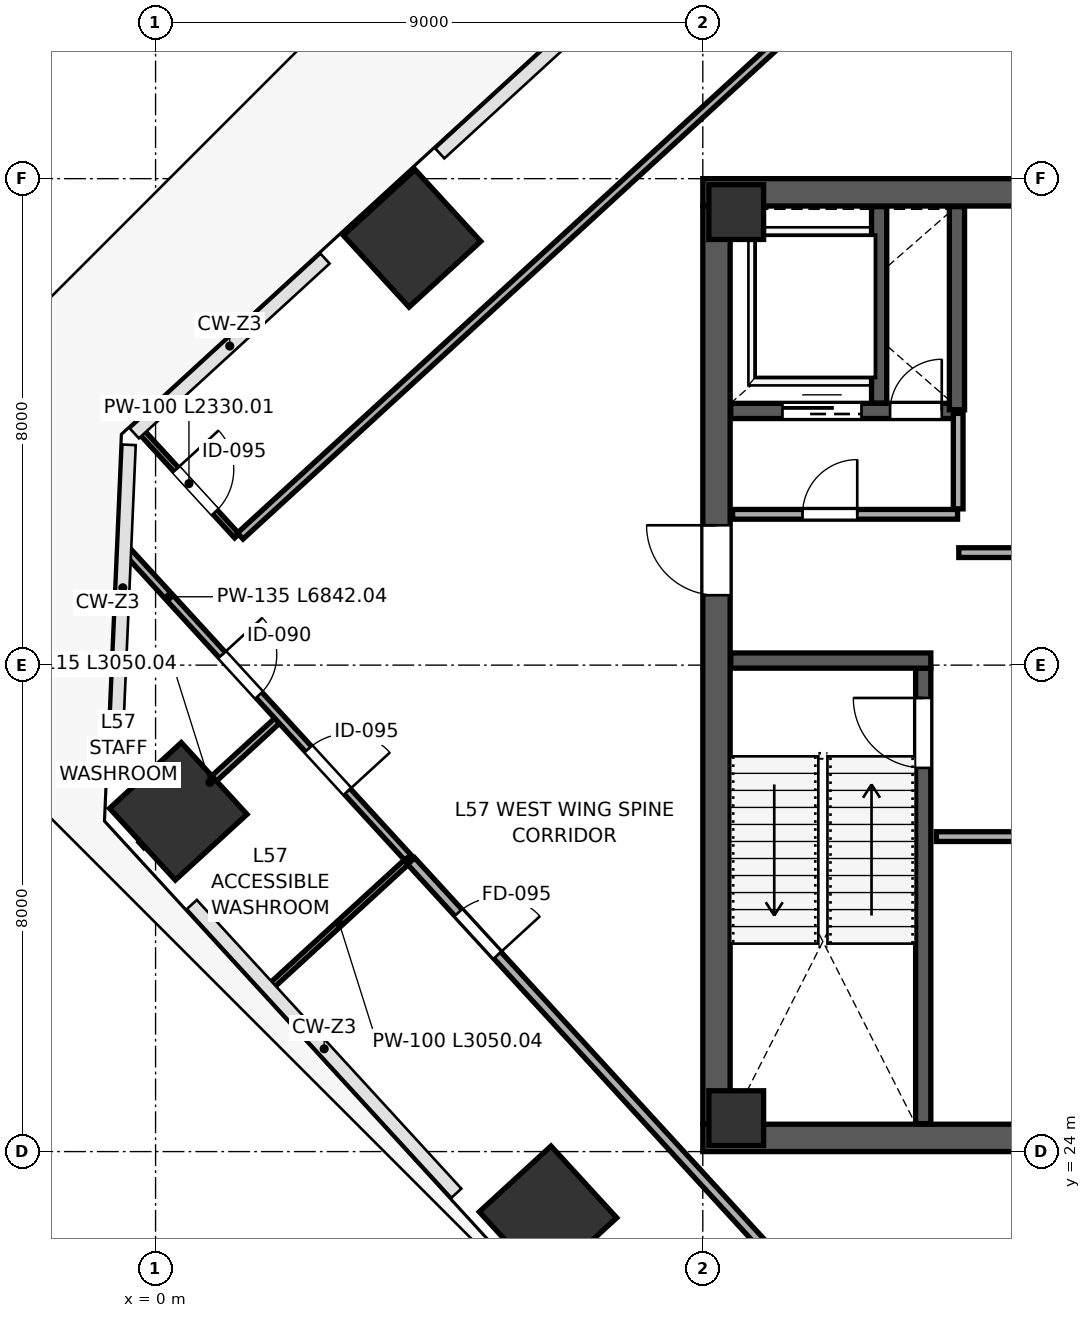
"""IFC4 building model, lengths in metres.
Left out: names, types, materials, properties, quantities, classifications, styles, units other than length and angle.
Written with IfcOpenShell. Run it as: python <this file> out.ifc"""

import sys

from ifc_helpers import new_model, si_unit, direction, frame, frame_2d, origin, origin_2d, place, context, subcontext, project, spatial, rectangle, extrude, source, transform, mapped, element, fill, save


model = new_model("IFC4")
c1 = context("Model", 3, precision=1e-05, world=origin(), true_north=direction((0.0, 1.0)))
c2 = subcontext(c1, "Body", "Model", "MODEL_VIEW")
j1 = project(units=[si_unit("LENGTHUNIT", "METRE"), si_unit("PLANEANGLEUNIT", "RADIAN")], contexts=[c1])
p1 = place(None, origin())
s1 = spatial("IfcSite", under=j1, at=p1, CompositionType="ELEMENT")
p2 = place(p1, origin())
s2 = spatial("IfcBuilding", under=s1, at=p2, CompositionType="ELEMENT")
p3 = place(p2, frame((0.0, 0.0, 254.2)))
s3 = spatial("IfcBuildingStorey", under=s2, at=p3, CompositionType="ELEMENT", Elevation=254.2)
m1 = source(origin(), c2, "Body", "SweptSolid", [
    extrude(rectangle(XDim=0.9, YDim=0.9, at=origin_2d()), origin(), (0.0, 0.0, 1.0), 4.198),
])
for number, where, z_axis, x_axis in (
    (1, (9.55, 24.55, 0.001), (0.0, 0.0, 1.0), (1.0, 0.0, 0.0)),
    (2, (9.55, 39.45, 0.001), (0.0, 0.0, 1.0), (1.0, 0.0, 0.0)),
):
    element("IfcColumn", number, at=place(p3, frame(where, z_axis=z_axis, x_axis=x_axis)), inside=s3, PredefinedType="COLUMN", context=c2, shape_type="MappedRepresentation", body=[
        mapped(m1, transform((0.0, 0.0, 0.0), scale=1.0)),
    ])
m2 = source(origin(), c2, "Body", "SweptSolid", [
    extrude(rectangle(XDim=1.6, YDim=1.6, at=origin_2d()), origin(), (0.0, 0.0, 1.0), 4.198),
])
for number, where, z_axis, x_axis in (
    (3, (0.374, 29.596, 0.001), (0.0, 0.0, 1.0), (-0.676, 0.737, 0.0)),
    (4, (6.454, 22.96, 0.001), (0.0, 0.0, 1.0), (-0.676, 0.737, 0.0)),
    (5, (4.218, 39.018, 0.001), (0.0, 0.0, 1.0), (-0.676, 0.737, 0.0)),
):
    element("IfcColumn", number, at=place(p3, frame(where, z_axis=z_axis, x_axis=x_axis)), inside=s3, PredefinedType="COLUMN", context=c2, shape_type="MappedRepresentation", body=[
        mapped(m2, transform((0.0, 0.0, 0.0), scale=1.0)),
    ])
p4 = place(p3, frame((9.225, 24.45, 0.0), z_axis=(0.0, 0.0, 1.0), x_axis=(0.0, 1.0, 0.0)))
e6 = element("IfcWall", 6, at=p4, inside=s3, PredefinedType="SHEAR", context=c2, shape_type="SweptSolid", body=[
    extrude(rectangle(XDim=15.1, YDim=0.45, at=frame_2d((7.55, 0.0))), origin(), (0.0, 0.0, 1.0), 3.96),
])
p5 = place(p4, frame((8.7, 0.0, 0.0)))
e7 = element("IfcOpeningElement", 7, at=p5, cuts=e6, PredefinedType="OPENING", context=c2, shape_type="SweptSolid", body=[
    extrude(rectangle(XDim=1.15, YDim=2.2, at=frame_2d((0.575, 1.1))), frame((0.0, 0.235, 0.0), z_axis=(0.0, -1.0, 0.0), x_axis=(1.0, 0.0, 0.0)), (0.0, 0.0, 1.0), 0.47),
])
for number, where, z_axis, x_axis in (
    (8, (9.0, 24.225, 0.0), (0.0, 0.0, 1.0), (1.0, 0.0, 0.0)),
    (9, (9.0, 39.775, 0.0), (0.0, 0.0, 1.0), (1.0, 0.0, 0.0)),
):
    element("IfcWall", number, at=place(p3, frame(where, z_axis=z_axis, x_axis=x_axis)), inside=s3, PredefinedType="SHEAR", context=c2, shape_type="SweptSolid", body=[
        extrude(rectangle(XDim=18.0, YDim=0.45, at=frame_2d((9.0, 0.0))), origin(), (0.0, 0.0, 1.0), 3.96),
    ])
p6 = place(p3, frame((12.625, 24.46, 0.0), z_axis=(0.0, 0.0, 1.0), x_axis=(0.0, 1.0, 0.0)))
e10 = element("IfcWall", 10, at=p6, inside=s3, PredefinedType="SHEAR", context=c2, shape_type="SweptSolid", body=[
    extrude(rectangle(XDim=7.49, YDim=0.25, at=frame_2d((3.745, 0.0))), origin(), (0.0, 0.0, 1.0), 3.96),
])
p7 = place(p6, frame((5.85, 0.0, 0.0)))
e11 = element("IfcOpeningElement", 11, at=p7, cuts=e10, PredefinedType="OPENING", context=c2, shape_type="SweptSolid", body=[
    extrude(rectangle(XDim=1.15, YDim=2.2, at=frame_2d((0.575, 1.1))), frame((0.0, 0.135, 0.0), z_axis=(0.0, -1.0, 0.0), x_axis=(1.0, 0.0, 0.0)), (0.0, 0.0, 1.0), 0.27),
])
p8 = place(p3, frame((9.46, 32.075, 0.0), z_axis=(0.0, 0.0, 1.0), x_axis=(1.0, 0.0, 0.0)))
e12 = element("IfcWall", 12, at=p8, inside=s3, PredefinedType="SHEAR", context=c2, shape_type="SweptSolid", body=[
    extrude(rectangle(XDim=3.29, YDim=0.25, at=frame_2d((1.645, 0.0))), origin(), (0.0, 0.0, 1.0), 3.96),
])
p9 = place(p3, frame((9.46, 36.18, 0.0), z_axis=(0.0, 0.0, 1.0), x_axis=(1.0, 0.0, 0.0)))
e13 = element("IfcWall", 13, at=p9, inside=s3, PredefinedType="SHEAR", context=c2, shape_type="SweptSolid", body=[
    extrude(rectangle(XDim=3.79, YDim=0.25, at=frame_2d((1.895, 0.0))), origin(), (0.0, 0.0, 1.0), 3.96),
])
p10 = place(p9, frame((2.62, 0.0, 0.0)))
e14 = element("IfcOpeningElement", 14, at=p10, cuts=e13, PredefinedType="OPENING", context=c2, shape_type="SweptSolid", body=[
    extrude(rectangle(XDim=0.85, YDim=2.1, at=frame_2d((0.425, 1.05))), frame((0.0, 0.135, 0.0), z_axis=(0.0, -1.0, 0.0), x_axis=(1.0, 0.0, 0.0)), (0.0, 0.0, 1.0), 0.27),
])
p11 = place(p9, frame((0.85, 0.0, 0.0)))
e15 = element("IfcOpeningElement", 15, at=p11, cuts=e13, PredefinedType="OPENING", context=c2, shape_type="SweptSolid", body=[
    extrude(rectangle(XDim=1.3, YDim=2.25, at=frame_2d((0.65, 1.125))), frame((0.0, 0.135, 0.0), z_axis=(0.0, -1.0, 0.0), x_axis=(1.0, 0.0, 0.0)), (0.0, 0.0, 1.0), 0.27),
])
p12 = place(p3, frame((11.9, 36.31, 0.0), z_axis=(0.0, 0.0, 1.0), x_axis=(0.0, 1.0, 0.0)))
e16 = element("IfcWall", 16, at=p12, inside=s3, PredefinedType="SHEAR", context=c2, shape_type="SweptSolid", body=[
    extrude(rectangle(XDim=3.23, YDim=0.25, at=frame_2d((1.615, 0.0))), origin(), (0.0, 0.0, 1.0), 3.96),
])
p13 = place(p3, frame((13.18, 36.2, 0.0), z_axis=(0.0, 0.0, 1.0), x_axis=(0.0, 1.0, 0.0)))
e17 = element("IfcWall", 17, at=p13, inside=s3, PredefinedType="SHEAR", context=c2, shape_type="SweptSolid", body=[
    extrude(rectangle(XDim=3.34, YDim=0.25, at=frame_2d((1.67, 0.0))), origin(), (0.0, 0.0, 1.0), 3.96),
])
p14 = place(p3, frame((9.49, 34.48, 0.0), z_axis=(0.0, 0.0, 1.0), x_axis=(1.0, 0.0, 0.0)))
e18 = element("IfcWall", 18, at=p14, inside=s3, PredefinedType="PARTITIONING", context=c2, shape_type="SweptSolid", body=[
    extrude(rectangle(XDim=3.7, YDim=0.16, at=frame_2d((1.85, 0.0))), origin(), (0.0, 0.0, 1.0), 3.96),
])
p15 = place(p14, frame((1.15, 0.0, 0.0)))
e19 = element("IfcOpeningElement", 19, at=p15, cuts=e18, PredefinedType="OPENING", context=c2, shape_type="SweptSolid", body=[
    extrude(rectangle(XDim=0.9, YDim=2.15, at=frame_2d((0.45, 1.075))), frame((0.0, 0.09, 0.0), z_axis=(0.0, -1.0, 0.0), x_axis=(1.0, 0.0, 0.0)), (0.0, 0.0, 1.0), 0.18),
])
p16 = place(p3, frame((13.2, 34.57, 0.0), z_axis=(0.0, 0.0, 1.0), x_axis=(0.0, 1.0, 0.0)))
e20 = element("IfcWall", 20, at=p16, inside=s3, PredefinedType="PARTITIONING", context=c2, shape_type="SweptSolid", body=[
    extrude(rectangle(XDim=1.57, YDim=0.16, at=frame_2d((0.785, 0.0))), origin(), (0.0, 0.0, 1.0), 3.96),
])
p17 = place(p3, frame((13.21, 33.85, 0.0), z_axis=(0.0, 0.0, 1.0), x_axis=(1.0, 0.0, 0.0)))
e21 = element("IfcWall", 21, at=p17, inside=s3, PredefinedType="PARTITIONING", context=c2, shape_type="SweptSolid", body=[
    extrude(rectangle(XDim=4.1, YDim=0.16, at=frame_2d((2.05, 0.0))), origin(), (0.0, 0.0, 1.0), 3.96),
])
p18 = place(p17, frame((1.35, 0.0, 0.0)))
e22 = element("IfcOpeningElement", 22, at=p18, cuts=e21, PredefinedType="OPENING", context=c2, shape_type="SweptSolid", body=[
    extrude(rectangle(XDim=0.9, YDim=2.15, at=frame_2d((0.45, 1.075))), frame((0.0, 0.09, 0.0), z_axis=(0.0, -1.0, 0.0), x_axis=(1.0, 0.0, 0.0)), (0.0, 0.0, 1.0), 0.18),
])
p19 = place(p3, frame((12.84, 29.18, 0.0), z_axis=(0.0, 0.0, 1.0), x_axis=(1.0, 0.0, 0.0)))
e23 = element("IfcWall", 23, at=p19, inside=s3, PredefinedType="PARTITIONING", context=c2, shape_type="SweptSolid", body=[
    extrude(rectangle(XDim=8.37, YDim=0.16, at=frame_2d((4.185, 0.0))), origin(), (0.0, 0.0, 1.0), 3.96),
])
p20 = place(p19, frame((2.6, 0.0, 0.0)))
e24 = element("IfcOpeningElement", 24, at=p20, cuts=e23, PredefinedType="OPENING", context=c2, shape_type="SweptSolid", body=[
    extrude(rectangle(XDim=0.9, YDim=2.15, at=frame_2d((0.45, 1.075))), frame((0.0, 0.09, 0.0), z_axis=(0.0, -1.0, 0.0), x_axis=(1.0, 0.0, 0.0)), (0.0, 0.0, 1.0), 0.18),
])
p21 = place(p3, frame((-0.231, 29.042, 0.0), z_axis=(0.0, 0.0, 1.0), x_axis=(0.737290351983, 0.675576003772, 0.0)))
e25 = element("IfcWall", 25, at=p21, inside=s3, PredefinedType="PARTITIONING", context=c2, shape_type="SweptSolid", body=[
    extrude(rectangle(XDim=3.05, YDim=0.115, at=frame_2d((1.525, 0.0))), origin(), (0.0, 0.0, 1.0), 3.295),
])
p22 = place(p3, frame((1.897, 26.719, 0.0), z_axis=(0.0, 0.0, 1.0), x_axis=(0.737290351983, 0.675576003772, 0.0)))
e26 = element("IfcWall", 26, at=p22, inside=s3, PredefinedType="PARTITIONING", context=c2, shape_type="SweptSolid", body=[
    extrude(rectangle(XDim=3.05, YDim=0.1, at=frame_2d((1.525, 0.0))), origin(), (0.0, 0.0, 1.0), 3.295),
])
p23 = place(p3, frame((-0.474, 33.881, 0.0), z_axis=(0.0, 0.0, 1.0), x_axis=(0.675605050901, -0.73726373517, 0.0)))
e27 = element("IfcWall", 27, at=p23, inside=s3, PredefinedType="PARTITIONING", context=c2, shape_type="SweptSolid", body=[
    extrude(rectangle(XDim=6.842, YDim=0.135, at=frame_2d((3.421, 0.0))), origin(), (0.0, 0.0, 1.0), 3.96),
])
p24 = place(p23, frame((2.32, 0.0, 0.0)))
e28 = element("IfcOpeningElement", 28, at=p24, cuts=e27, PredefinedType="OPENING", context=c2, shape_type="SweptSolid", body=[
    extrude(rectangle(XDim=0.9, YDim=2.15, at=frame_2d((0.45, 1.075))), frame((0.0, 0.078, 0.0), z_axis=(0.0, -1.0, 0.0), x_axis=(1.0, 0.0, 0.0)), (0.0, 0.0, 1.0), 0.155),
])
p25 = place(p23, frame((4.42, 0.0, 0.0)))
e29 = element("IfcOpeningElement", 29, at=p25, cuts=e27, PredefinedType="OPENING", context=c2, shape_type="SweptSolid", body=[
    extrude(rectangle(XDim=0.95, YDim=2.15, at=frame_2d((0.475, 1.075))), frame((0.0, 0.078, 0.0), z_axis=(0.0, -1.0, 0.0), x_axis=(1.0, 0.0, 0.0)), (0.0, 0.0, 1.0), 0.155),
])
p26 = place(p3, frame((4.203, 28.778, 0.0), z_axis=(0.0, 0.0, 1.0), x_axis=(0.675591041558, -0.737276572642, 0.0)))
e30 = element("IfcWall", 30, at=p26, inside=s3, PredefinedType="PARTITIONING", context=c2, shape_type="SweptSolid", body=[
    extrude(rectangle(XDim=14.07, YDim=0.16, at=frame_2d((7.035, 0.0))), origin(), (0.0, 0.0, 1.0), 3.96),
])
p27 = place(p26, frame((1.15, 0.0, 0.0)))
e31 = element("IfcOpeningElement", 31, at=p27, cuts=e30, PredefinedType="OPENING", context=c2, shape_type="SweptSolid", body=[
    extrude(rectangle(XDim=0.95, YDim=2.15, at=frame_2d((0.475, 1.075))), frame((0.0, 0.09, 0.0), z_axis=(0.0, -1.0, 0.0), x_axis=(1.0, 0.0, 0.0)), (0.0, 0.0, 1.0), 0.18),
])
p28 = place(p3, frame((13.765, 18.402, 0.0), z_axis=(0.0, 0.0, 1.0), x_axis=(0.737266340408, 0.675602207887, 0.0)))
e32 = element("IfcWall", 32, at=p28, inside=s3, PredefinedType="PARTITIONING", context=c2, shape_type="SweptSolid", body=[
    extrude(rectangle(XDim=8.128, YDim=0.16, at=frame_2d((4.064, 0.0))), origin(), (0.0, 0.0, 1.0), 3.96),
])
p29 = place(p3, frame((-0.238, 35.844, 0.0), z_axis=(0.0, 0.0, 1.0), x_axis=(0.67562972666, -0.737241122329, 0.0)))
e33 = element("IfcWall", 33, at=p29, inside=s3, PredefinedType="PARTITIONING", context=c2, shape_type="SweptSolid", body=[
    extrude(rectangle(XDim=2.33, YDim=0.1, at=frame_2d((1.165, 0.0))), origin(), (0.0, 0.0, 1.0), 3.96),
])
p30 = place(p29, frame((0.85, 0.0, 0.0)))
e34 = element("IfcOpeningElement", 34, at=p30, cuts=e33, PredefinedType="OPENING", context=c2, shape_type="SweptSolid", body=[
    extrude(rectangle(XDim=0.95, YDim=2.15, at=frame_2d((0.475, 1.075))), frame((0.0, 0.06, 0.0), z_axis=(0.0, -1.0, 0.0), x_axis=(1.0, 0.0, 0.0)), (0.0, 0.0, 1.0), 0.12),
])
p31 = place(p3, frame((1.393, 34.124, 0.0), z_axis=(0.0, 0.0, 1.0), x_axis=(0.737274323436, 0.675593496121, 0.0)))
e35 = element("IfcWall", 35, at=p31, inside=s3, PredefinedType="PARTITIONING", context=c2, shape_type="SweptSolid", body=[
    extrude(rectangle(XDim=27.402, YDim=0.135, at=frame_2d((13.701, 0.0))), origin(), (0.0, 0.0, 1.0), 3.96),
])
p32 = place(p3, frame((12.47, 15.181, 0.0), z_axis=(0.0, 0.0, 1.0), x_axis=(0.737265724175, 0.675602880365, 0.0)))
e36 = element("IfcWall", 36, at=p32, inside=s3, PredefinedType="PARTITIONING", context=c2, shape_type="SweptSolid", body=[
    extrude(rectangle(XDim=12.895, YDim=0.16, at=frame_2d((6.448, 0.0))), origin(), (0.0, 0.0, 1.0), 3.96),
])
m3 = source(origin(), c2, "Body", "SweptSolid", [
    extrude(rectangle(XDim=1.15, YDim=2.2, at=frame_2d((0.575, 1.1))), frame((0.0, 0.025, 0.0), z_axis=(0.0, -1.0, 0.0), x_axis=(1.0, 0.0, 0.0)), (0.0, 0.0, 1.0), 0.05),
])
p33 = place(p7, origin())
e37 = element("IfcDoor", 37, at=p33, inside=s3, OperationType="SINGLE_SWING_RIGHT", PredefinedType="DOOR", context=c2, shape_type="MappedRepresentation", body=[
    mapped(m3, transform((0.0, 0.0, 0.0), scale=1.0)),
])
fill(e11, e37)
m4 = source(origin(), c2, "Body", "SweptSolid", [
    extrude(rectangle(XDim=1.15, YDim=2.2, at=frame_2d((0.575, 1.1))), frame((0.0, 0.025, 0.0), z_axis=(0.0, -1.0, 0.0), x_axis=(1.0, 0.0, 0.0)), (0.0, 0.0, 1.0), 0.05),
])
p34 = place(p5, origin())
e38 = element("IfcDoor", 38, at=p34, inside=s3, OperationType="SINGLE_SWING_RIGHT", PredefinedType="DOOR", context=c2, shape_type="MappedRepresentation", body=[
    mapped(m4, transform((0.0, 0.0, 0.0), scale=1.0)),
])
fill(e7, e38)
m5 = source(origin(), c2, "Body", "SweptSolid", [
    extrude(rectangle(XDim=0.85, YDim=2.1, at=frame_2d((0.425, 1.05))), frame((0.0, 0.025, 0.0), z_axis=(0.0, -1.0, 0.0), x_axis=(1.0, 0.0, 0.0)), (0.0, 0.0, 1.0), 0.05),
])
p35 = place(p10, origin())
e39 = element("IfcDoor", 39, at=p35, inside=s3, OperationType="SINGLE_SWING_RIGHT", PredefinedType="DOOR", context=c2, shape_type="MappedRepresentation", body=[
    mapped(m5, transform((0.0, 0.0, 0.0), scale=1.0)),
])
fill(e14, e39)
m6 = source(origin(), c2, "Body", "SweptSolid", [
    extrude(rectangle(XDim=1.3, YDim=2.25, at=frame_2d((0.65, 1.125))), frame((0.0, 0.025, 0.0), z_axis=(0.0, -1.0, 0.0), x_axis=(1.0, 0.0, 0.0)), (0.0, 0.0, 1.0), 0.05),
])
p36 = place(p11, origin())
e40 = element("IfcDoor", 40, at=p36, inside=s3, OperationType="SLIDING_TO_LEFT", PredefinedType="DOOR", context=c2, shape_type="MappedRepresentation", body=[
    mapped(m6, transform((0.0, 0.0, 0.0), scale=1.0)),
])
fill(e15, e40)
m7 = source(origin(), c2, "Body", "SweptSolid", [
    extrude(rectangle(XDim=0.9, YDim=2.15, at=frame_2d((0.45, 1.075))), frame((0.0, 0.025, 0.0), z_axis=(0.0, -1.0, 0.0), x_axis=(1.0, 0.0, 0.0)), (0.0, 0.0, 1.0), 0.05),
])
p37 = place(p15, origin())
e41 = element("IfcDoor", 41, at=p37, inside=s3, OperationType="SINGLE_SWING_RIGHT", PredefinedType="DOOR", context=c2, shape_type="MappedRepresentation", body=[
    mapped(m7, transform((0.0, 0.0, 0.0), scale=1.0)),
])
fill(e19, e41)
m8 = source(origin(), c2, "Body", "SweptSolid", [
    extrude(rectangle(XDim=0.9, YDim=2.15, at=frame_2d((0.45, 1.075))), frame((0.0, 0.025, 0.0), z_axis=(0.0, -1.0, 0.0), x_axis=(1.0, 0.0, 0.0)), (0.0, 0.0, 1.0), 0.05),
])
p38 = place(p24, origin())
e42 = element("IfcDoor", 42, at=p38, inside=s3, OperationType="SINGLE_SWING_LEFT", PredefinedType="DOOR", context=c2, shape_type="MappedRepresentation", body=[
    mapped(m8, transform((0.0, 0.0, 0.0), scale=1.0)),
])
fill(e28, e42)
m9 = source(origin(), c2, "Body", "SweptSolid", [
    extrude(rectangle(XDim=0.95, YDim=2.15, at=frame_2d((0.475, 1.075))), frame((0.0, 0.025, 0.0), z_axis=(0.0, -1.0, 0.0), x_axis=(1.0, 0.0, 0.0)), (0.0, 0.0, 1.0), 0.05),
])
p39 = place(p25, origin())
e43 = element("IfcDoor", 43, at=p39, inside=s3, OperationType="SINGLE_SWING_RIGHT", PredefinedType="DOOR", context=c2, shape_type="MappedRepresentation", body=[
    mapped(m9, transform((0.0, 0.0, 0.0), scale=1.0)),
])
fill(e29, e43)
m10 = source(origin(), c2, "Body", "SweptSolid", [
    extrude(rectangle(XDim=0.95, YDim=2.15, at=frame_2d((0.475, 1.075))), frame((0.0, 0.025, 0.0), z_axis=(0.0, -1.0, 0.0), x_axis=(1.0, 0.0, 0.0)), (0.0, 0.0, 1.0), 0.05),
])
p40 = place(p27, origin())
e44 = element("IfcDoor", 44, at=p40, inside=s3, OperationType="SINGLE_SWING_RIGHT", PredefinedType="DOOR", context=c2, shape_type="MappedRepresentation", body=[
    mapped(m10, transform((0.0, 0.0, 0.0), scale=1.0)),
])
fill(e31, e44)
p41 = place(p30, origin())
e45 = element("IfcDoor", 45, at=p41, inside=s3, OperationType="SINGLE_SWING_LEFT", PredefinedType="DOOR", context=c2, shape_type="MappedRepresentation", body=[
    mapped(m9, transform((0.0, 0.0, 0.0), scale=1.0)),
])
fill(e34, e45)
save(model, sys.argv[1])
